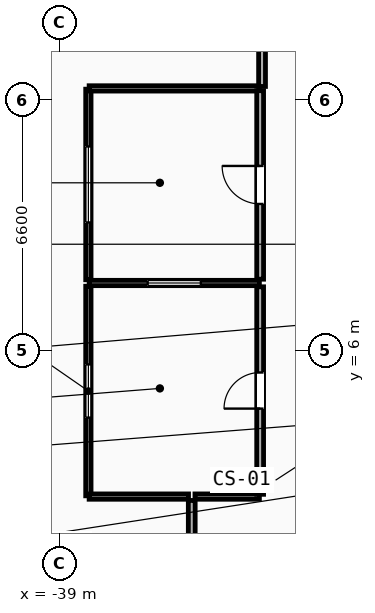
"""IFC4 building model, lengths in metres.
Left out: names, types, materials, properties, quantities, classifications, styles, units other than length and angle.
Written with IfcOpenShell. Run it as: python <this file> out.ifc"""

import sys

from ifc_helpers import new_model, si_unit, direction, frame, frame_2d, origin, place, context, subcontext, project, spatial, rectangle, extrude, element, fill, save


model = new_model("IFC4")
c1 = context("Model", 3, precision=1e-05, world=origin(), true_north=direction((0.0, 1.0)))
c2 = subcontext(c1, "Body", "Model", "MODEL_VIEW")
j1 = project(units=[si_unit("LENGTHUNIT", "METRE"), si_unit("PLANEANGLEUNIT", "RADIAN")], contexts=[c1])
p1 = place(None, origin())
s1 = spatial("IfcSite", under=j1, at=p1, CompositionType="ELEMENT")
p2 = place(p1, origin())
s2 = spatial("IfcBuilding", under=s1, at=p2, CompositionType="ELEMENT")
p3 = place(p2, frame((0.0, 0.0, 6.0)))
s3 = spatial("IfcBuildingStorey", under=s2, at=p3, CompositionType="ELEMENT", Elevation=6.0)
p4 = place(p3, frame((-38.24, 2.18, 0.0), z_axis=(0.0, 0.0, 1.0), x_axis=(0.0, 1.0, 0.0)))
e1 = element("IfcWall", 1, at=p4, inside=s3, PredefinedType="PARTITIONING", context=c2, shape_type="SweptSolid", body=[
    extrude(rectangle(XDim=5.515, YDim=0.14, at=frame_2d((2.758, 0.0))), origin(), (0.0, 0.0, 1.0), 5.65),
])
p5 = place(p4, frame((2.058, 0.0, 1.05)))
e2 = element("IfcOpeningElement", 2, at=p5, cuts=e1, PredefinedType="OPENING", context=c2, shape_type="SweptSolid", body=[
    extrude(rectangle(XDim=1.4, YDim=1.5, at=frame_2d((0.7, 0.75))), frame((0.0, 0.08, 0.0), z_axis=(0.0, -1.0, 0.0), x_axis=(1.0, 0.0, 0.0)), (0.0, 0.0, 1.0), 0.16),
])
p6 = place(p3, frame((-38.24, 7.865, 0.0), z_axis=(0.0, 0.0, 1.0), x_axis=(0.0, 1.0, 0.0)))
e3 = element("IfcWall", 3, at=p6, inside=s3, PredefinedType="PARTITIONING", context=c2, shape_type="SweptSolid", body=[
    extrude(rectangle(XDim=5.015, YDim=0.14, at=frame_2d((2.507, 0.0))), origin(), (0.0, 0.0, 1.0), 5.65),
])
p7 = place(p6, frame((1.508, 0.0, 1.05)))
e4 = element("IfcOpeningElement", 4, at=p7, cuts=e3, PredefinedType="OPENING", context=c2, shape_type="SweptSolid", body=[
    extrude(rectangle(XDim=2.0, YDim=1.5, at=frame_2d((1.0, 0.75))), frame((0.0, 0.08, 0.0), z_axis=(0.0, -1.0, 0.0), x_axis=(1.0, 0.0, 0.0)), (0.0, 0.0, 1.0), 0.16),
])
p8 = place(p3, frame((-38.22, 2.16, 0.0), z_axis=(0.0, 0.0, 1.0), x_axis=(1.0, 0.0, 0.0)))
e5 = element("IfcWall", 5, at=p8, inside=s3, PredefinedType="PARTITIONING", context=c2, shape_type="SweptSolid", body=[
    extrude(rectangle(XDim=2.615, YDim=0.14, at=frame_2d((1.308, 0.0))), origin(), (0.0, 0.0, 1.0), 5.65),
])
p9 = place(p3, frame((-35.435, 2.16, 0.0), z_axis=(0.0, 0.0, 1.0), x_axis=(1.0, 0.0, 0.0)))
e6 = element("IfcWall", 6, at=p9, inside=s3, PredefinedType="PARTITIONING", context=c2, shape_type="SweptSolid", body=[
    extrude(rectangle(XDim=1.695, YDim=0.14, at=frame_2d((0.848, 0.0))), origin(), (0.0, 0.0, 1.0), 5.65),
])
p10 = place(p3, frame((-38.22, 7.78, 0.0), z_axis=(0.0, 0.0, 1.0), x_axis=(1.0, 0.0, 0.0)))
e7 = element("IfcWall", 7, at=p10, inside=s3, PredefinedType="PARTITIONING", context=c2, shape_type="SweptSolid", body=[
    extrude(rectangle(XDim=4.48, YDim=0.14, at=frame_2d((2.24, 0.0))), origin(), (0.0, 0.0, 1.0), 5.65),
])
p11 = place(p10, frame((1.54, 0.0, 1.05)))
e8 = element("IfcOpeningElement", 8, at=p11, cuts=e7, PredefinedType="OPENING", context=c2, shape_type="SweptSolid", body=[
    extrude(rectangle(XDim=1.4, YDim=1.5, at=frame_2d((0.7, 0.75))), frame((0.0, 0.08, 0.0), z_axis=(0.0, -1.0, 0.0), x_axis=(1.0, 0.0, 0.0)), (0.0, 0.0, 1.0), 0.16),
])
p12 = place(p3, frame((-38.22, 12.9, 0.0), z_axis=(0.0, 0.0, 1.0), x_axis=(1.0, 0.0, 0.0)))
e9 = element("IfcWall", 9, at=p12, inside=s3, PredefinedType="PARTITIONING", context=c2, shape_type="SweptSolid", body=[
    extrude(rectangle(XDim=4.48, YDim=0.14, at=frame_2d((2.24, 0.0))), origin(), (0.0, 0.0, 1.0), 5.65),
])
p13 = place(p3, frame((-33.72, 2.22, 0.0), z_axis=(0.0, 0.0, 1.0), x_axis=(0.0, 1.0, 0.0)))
e10 = element("IfcWall", 10, at=p13, inside=s3, PredefinedType="PARTITIONING", context=c2, shape_type="SweptSolid", body=[
    extrude(rectangle(XDim=5.46, YDim=0.18, at=frame_2d((2.73, 0.0))), origin(), (0.0, 0.0, 1.0), 5.65),
])
p14 = place(p13, frame((2.255, 0.0, 0.0)))
e11 = element("IfcOpeningElement", 11, at=p14, cuts=e10, PredefinedType="OPENING", context=c2, shape_type="SweptSolid", body=[
    extrude(rectangle(XDim=0.95, YDim=2.1, at=frame_2d((0.475, 1.05))), frame((0.0, 0.1, 0.0), z_axis=(0.0, -1.0, 0.0), x_axis=(1.0, 0.0, 0.0)), (0.0, 0.0, 1.0), 0.2),
])
p15 = place(p3, frame((-33.72, 7.88, 0.0), z_axis=(0.0, 0.0, 1.0), x_axis=(0.0, 1.0, 0.0)))
e12 = element("IfcWall", 12, at=p15, inside=s3, PredefinedType="PARTITIONING", context=c2, shape_type="SweptSolid", body=[
    extrude(rectangle(XDim=4.96, YDim=0.18, at=frame_2d((2.48, 0.0))), origin(), (0.0, 0.0, 1.0), 5.65),
])
p16 = place(p15, frame((1.98, 0.0, 0.0)))
e13 = element("IfcOpeningElement", 13, at=p16, cuts=e12, PredefinedType="OPENING", context=c2, shape_type="SweptSolid", body=[
    extrude(rectangle(XDim=1.0, YDim=2.15, at=frame_2d((0.5, 1.075))), frame((0.0, 0.1, 0.0), z_axis=(0.0, -1.0, 0.0), x_axis=(1.0, 0.0, 0.0)), (0.0, 0.0, 1.0), 0.2),
])
p17 = place(p3, frame((-33.67, 17.428, 0.0), z_axis=(0.0, 0.0, 1.0), x_axis=(0.0, -1.0, 0.0)))
e14 = element("IfcWall", 14, at=p17, inside=s3, PredefinedType="PARTITIONING", context=c2, shape_type="SweptSolid", body=[
    extrude(rectangle(XDim=4.477, YDim=0.18, at=frame_2d((2.239, 0.0))), origin(), (0.0, 0.0, 1.0), 5.65),
])
p18 = place(p3, frame((-35.52, 2.059, 0.0), z_axis=(0.0, 0.0, 1.0), x_axis=(0.0, -1.0, 0.0)))
e15 = element("IfcWall", 15, at=p18, inside=s3, PredefinedType="PARTITIONING", context=c2, shape_type="SweptSolid", body=[
    extrude(rectangle(XDim=4.117, YDim=0.18, at=frame_2d((2.059, 0.0))), origin(), (0.0, 0.0, 1.0), 5.65),
])
p19 = place(p14, origin())
e16 = element("IfcDoor", 16, at=p19, inside=s3, OperationType="SINGLE_SWING_LEFT", PredefinedType="DOOR", context=c2, shape_type="SweptSolid", body=[
    extrude(rectangle(XDim=0.95, YDim=2.1, at=frame_2d((0.475, 1.05))), frame((0.0, 0.025, 0.0), z_axis=(0.0, -1.0, 0.0), x_axis=(1.0, 0.0, 0.0)), (0.0, 0.0, 1.0), 0.05),
])
fill(e11, e16)
p20 = place(p16, origin())
e17 = element("IfcDoor", 17, at=p20, inside=s3, OperationType="SINGLE_SWING_RIGHT", PredefinedType="DOOR", context=c2, shape_type="SweptSolid", body=[
    extrude(rectangle(XDim=1.0, YDim=2.15, at=frame_2d((0.5, 1.075))), frame((0.0, 0.025, 0.0), z_axis=(0.0, -1.0, 0.0), x_axis=(1.0, 0.0, 0.0)), (0.0, 0.0, 1.0), 0.05),
])
fill(e13, e17)
p21 = place(p5, origin())
e18 = element("IfcWindow", 18, at=p21, inside=s3, PartitioningType="SINGLE_PANEL", PredefinedType="WINDOW", context=c2, shape_type="SweptSolid", body=[
    extrude(rectangle(XDim=1.4, YDim=1.5, at=frame_2d((0.7, 0.75))), frame((0.0, 0.03, 0.0), z_axis=(0.0, -1.0, 0.0), x_axis=(1.0, 0.0, 0.0)), (0.0, 0.0, 1.0), 0.06),
])
fill(e2, e18)
p22 = place(p7, origin())
e19 = element("IfcWindow", 19, at=p22, inside=s3, PartitioningType="SINGLE_PANEL", PredefinedType="WINDOW", context=c2, shape_type="SweptSolid", body=[
    extrude(rectangle(XDim=2.0, YDim=1.5, at=frame_2d((1.0, 0.75))), frame((0.0, 0.03, 0.0), z_axis=(0.0, -1.0, 0.0), x_axis=(1.0, 0.0, 0.0)), (0.0, 0.0, 1.0), 0.06),
])
fill(e4, e19)
p23 = place(p11, origin())
e20 = element("IfcWindow", 20, at=p23, inside=s3, PartitioningType="SINGLE_PANEL", PredefinedType="WINDOW", context=c2, shape_type="SweptSolid", body=[
    extrude(rectangle(XDim=1.4, YDim=1.5, at=frame_2d((0.7, 0.75))), frame((0.0, 0.03, 0.0), z_axis=(0.0, -1.0, 0.0), x_axis=(1.0, 0.0, 0.0)), (0.0, 0.0, 1.0), 0.06),
])
fill(e8, e20)
save(model, sys.argv[1])
